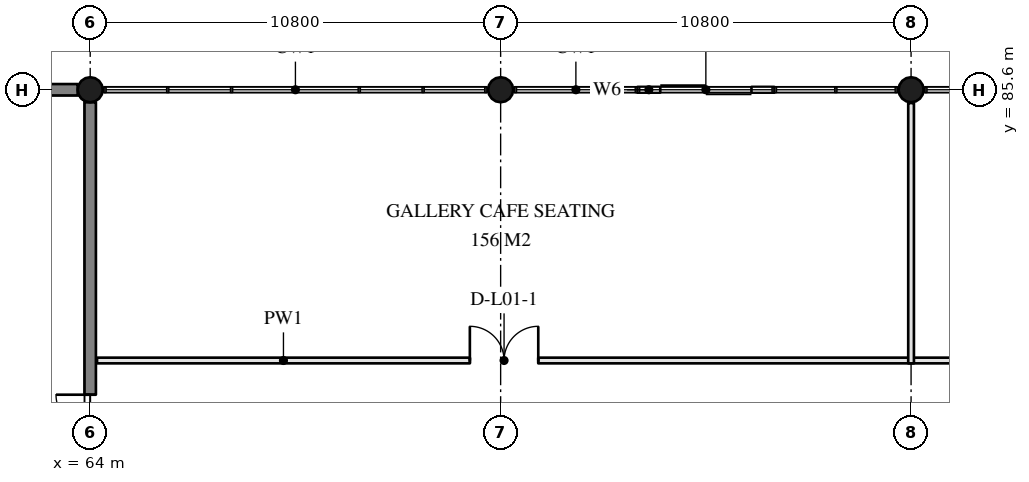
"""IFC4 building model, lengths in metres.
Left out: names, types, materials, properties, quantities, classifications, styles, units other than length and angle.
Written with IfcOpenShell. Run it as: python <this file> out.ifc"""

import sys

from ifc_helpers import new_model, si_unit, direction, frame, frame_2d, origin, origin_2d, place, context, subcontext, project, spatial, rectangle, hollow_circle, extrude, element, fill, save


model = new_model("IFC4")
c1 = context("Model", 3, precision=1e-05, world=origin(), true_north=direction((0.0, 1.0)))
c2 = subcontext(c1, "Body", "Model", "MODEL_VIEW")
j1 = project(units=[si_unit("LENGTHUNIT", "METRE"), si_unit("PLANEANGLEUNIT", "RADIAN")], contexts=[c1])
p1 = place(None, origin())
s1 = spatial("IfcSite", under=j1, at=p1, CompositionType="ELEMENT")
p2 = place(p1, origin())
s2 = spatial("IfcBuilding", under=s1, at=p2, CompositionType="ELEMENT")
p3 = place(p2, frame((0.0, 0.0, 4.8)))
s3 = spatial("IfcBuildingStorey", under=s2, at=p3, CompositionType="ELEMENT", Elevation=4.8)
for number, where, z_axis, x_axis in (
    (1, (64.0, 85.6, 0.0), (0.0, 0.0, 1.0), (1.0, 0.0, 0.0)),
    (2, (74.8, 85.6, 0.0), (0.0, 0.0, 1.0), (1.0, 0.0, 0.0)),
    (3, (85.6, 85.6, 0.0), (0.0, 0.0, 1.0), (1.0, 0.0, 0.0)),
):
    element("IfcColumn", number, at=place(p3, frame(where, z_axis=z_axis, x_axis=x_axis)), inside=s3, PredefinedType="COLUMN", context=c2, shape_type="SweptSolid", body=[
        extrude(hollow_circle(Radius=0.33, WallThickness=0.025, at=origin_2d()), origin(), (0.0, 0.0, 1.0), 3.9),
    ])
p4 = place(p3, frame((64.0, 75.105, 0.0), z_axis=(0.0, 0.0, 1.0), x_axis=(0.0, 1.0, 0.0)))
e4 = element("IfcWall", 4, at=p4, inside=s3, PredefinedType="SOLIDWALL", context=c2, shape_type="SweptSolid", body=[
    extrude(rectangle(XDim=10.165, YDim=0.3, at=frame_2d((5.083, 0.0))), origin(), (0.0, 0.0, 1.0), 3.9),
])
p5 = place(p4, frame((0.67, 0.0, 0.0)))
e5 = element("IfcOpeningElement", 5, at=p5, cuts=e4, PredefinedType="OPENING", context=c2, shape_type="SweptSolid", body=[
    extrude(rectangle(XDim=1.8, YDim=2.1, at=frame_2d((0.9, 1.05))), frame((0.0, 0.16, 0.0), z_axis=(0.0, -1.0, 0.0), x_axis=(1.0, 0.0, 0.0)), (0.0, 0.0, 1.0), 0.32),
])
p6 = place(p3, frame((63.67, 85.6, 0.0), z_axis=(0.0, 0.0, 1.0), x_axis=(-1.0, 0.0, 0.0)))
e6 = element("IfcWall", 6, at=p6, inside=s3, PredefinedType="SOLIDWALL", context=c2, shape_type="SweptSolid", body=[
    extrude(rectangle(XDim=10.14, YDim=0.3, at=frame_2d((5.07, 0.0))), origin(), (0.0, 0.0, 1.0), 3.9),
])
p7 = place(p3, frame((78.4, 85.6, 0.0), z_axis=(0.0, 0.0, 1.0), x_axis=(1.0, 0.0, 0.0)))
e7 = element("IfcWall", 7, at=p7, inside=s3, PredefinedType="SOLIDWALL", context=c2, shape_type="SweptSolid", body=[
    extrude(rectangle(XDim=3.6, YDim=0.15, at=frame_2d((1.8, 0.0))), origin(), (0.0, 0.0, 1.0), 2.6),
])
p8 = place(p7, frame((0.6, 0.0, 0.0)))
e8 = element("IfcOpeningElement", 8, at=p8, cuts=e7, PredefinedType="OPENING", context=c2, shape_type="SweptSolid", body=[
    extrude(rectangle(XDim=2.4, YDim=2.4, at=frame_2d((1.2, 1.2))), frame((0.0, 0.085, 0.0), z_axis=(0.0, -1.0, 0.0), x_axis=(1.0, 0.0, 0.0)), (0.0, 0.0, 1.0), 0.17),
])
p9 = place(p3, frame((64.18, 78.475, 0.0), z_axis=(0.0, 0.0, 1.0), x_axis=(1.0, 0.0, 0.0)))
e9 = element("IfcWall", 9, at=p9, inside=s3, PredefinedType="PARTITIONING", context=c2, shape_type="SweptSolid", body=[
    extrude(rectangle(XDim=21.42, YDim=0.15, at=frame_2d((10.71, 0.0))), origin(), (0.0, 0.0, 1.0), 3.1),
])
p10 = place(p9, frame((9.81, 0.0, 0.0)))
e10 = element("IfcOpeningElement", 10, at=p10, cuts=e9, PredefinedType="OPENING", context=c2, shape_type="SweptSolid", body=[
    extrude(rectangle(XDim=1.8, YDim=2.1, at=frame_2d((0.9, 1.05))), frame((0.0, 0.085, 0.0), z_axis=(0.0, -1.0, 0.0), x_axis=(1.0, 0.0, 0.0)), (0.0, 0.0, 1.0), 0.17),
])
p11 = place(p3, frame((85.6, 78.475, 0.0), z_axis=(0.0, 0.0, 1.0), x_axis=(1.0, 0.0, 0.0)))
e11 = element("IfcWall", 11, at=p11, inside=s3, PredefinedType="PARTITIONING", context=c2, shape_type="SweptSolid", body=[
    extrude(rectangle(XDim=10.8, YDim=0.15, at=frame_2d((5.4, 0.0))), origin(), (0.0, 0.0, 1.0), 3.1),
])
p12 = place(p11, frame((4.9, 0.0, 0.0)))
e12 = element("IfcOpeningElement", 12, at=p12, cuts=e11, PredefinedType="OPENING", context=c2, shape_type="SweptSolid", body=[
    extrude(rectangle(XDim=1.0, YDim=2.1, at=frame_2d((0.5, 1.05))), frame((0.0, 0.085, 0.0), z_axis=(0.0, -1.0, 0.0), x_axis=(1.0, 0.0, 0.0)), (0.0, 0.0, 1.0), 0.17),
])
p13 = place(p3, frame((85.6, 78.4, 0.0), z_axis=(0.0, 0.0, 1.0), x_axis=(0.0, 1.0, 0.0)))
e13 = element("IfcWall", 13, at=p13, inside=s3, PredefinedType="PARTITIONING", context=c2, shape_type="SweptSolid", body=[
    extrude(rectangle(XDim=6.85, YDim=0.15, at=frame_2d((3.425, 0.0))), origin(), (0.0, 0.0, 1.0), 3.1),
])
p14 = place(p8, origin())
e14 = element("IfcDoor", 14, at=p14, inside=s3, OperationType="DOUBLE_DOOR_SLIDING", PredefinedType="DOOR", context=c2, shape_type="SweptSolid", body=[
    extrude(rectangle(XDim=2.4, YDim=2.4, at=frame_2d((1.2, 1.2))), frame((0.0, 0.025, 0.0), z_axis=(0.0, -1.0, 0.0), x_axis=(1.0, 0.0, 0.0)), (0.0, 0.0, 1.0), 0.05),
])
fill(e8, e14)
p15 = place(p5, frame((1.8, 0.0, 0.0), z_axis=(0.0, 0.0, 1.0), x_axis=(-1.0, 0.0, 0.0)))
e15 = element("IfcDoor", 15, at=p15, inside=s3, OperationType="DOUBLE_DOOR_DOUBLE_SWING", PredefinedType="DOOR", context=c2, shape_type="SweptSolid", body=[
    extrude(rectangle(XDim=1.8, YDim=2.1, at=frame_2d((0.9, 1.05))), frame((0.0, 0.025, 0.0), z_axis=(0.0, -1.0, 0.0), x_axis=(1.0, 0.0, 0.0)), (0.0, 0.0, 1.0), 0.05),
])
fill(e5, e15)
p16 = place(p10, frame((1.8, 0.0, 0.0), z_axis=(0.0, 0.0, 1.0), x_axis=(-1.0, 0.0, 0.0)))
e16 = element("IfcDoor", 16, at=p16, inside=s3, OperationType="DOUBLE_DOOR_DOUBLE_SWING", PredefinedType="DOOR", context=c2, shape_type="SweptSolid", body=[
    extrude(rectangle(XDim=1.8, YDim=2.1, at=frame_2d((0.9, 1.05))), frame((0.0, 0.025, 0.0), z_axis=(0.0, -1.0, 0.0), x_axis=(1.0, 0.0, 0.0)), (0.0, 0.0, 1.0), 0.05),
])
fill(e10, e16)
save(model, sys.argv[1])
